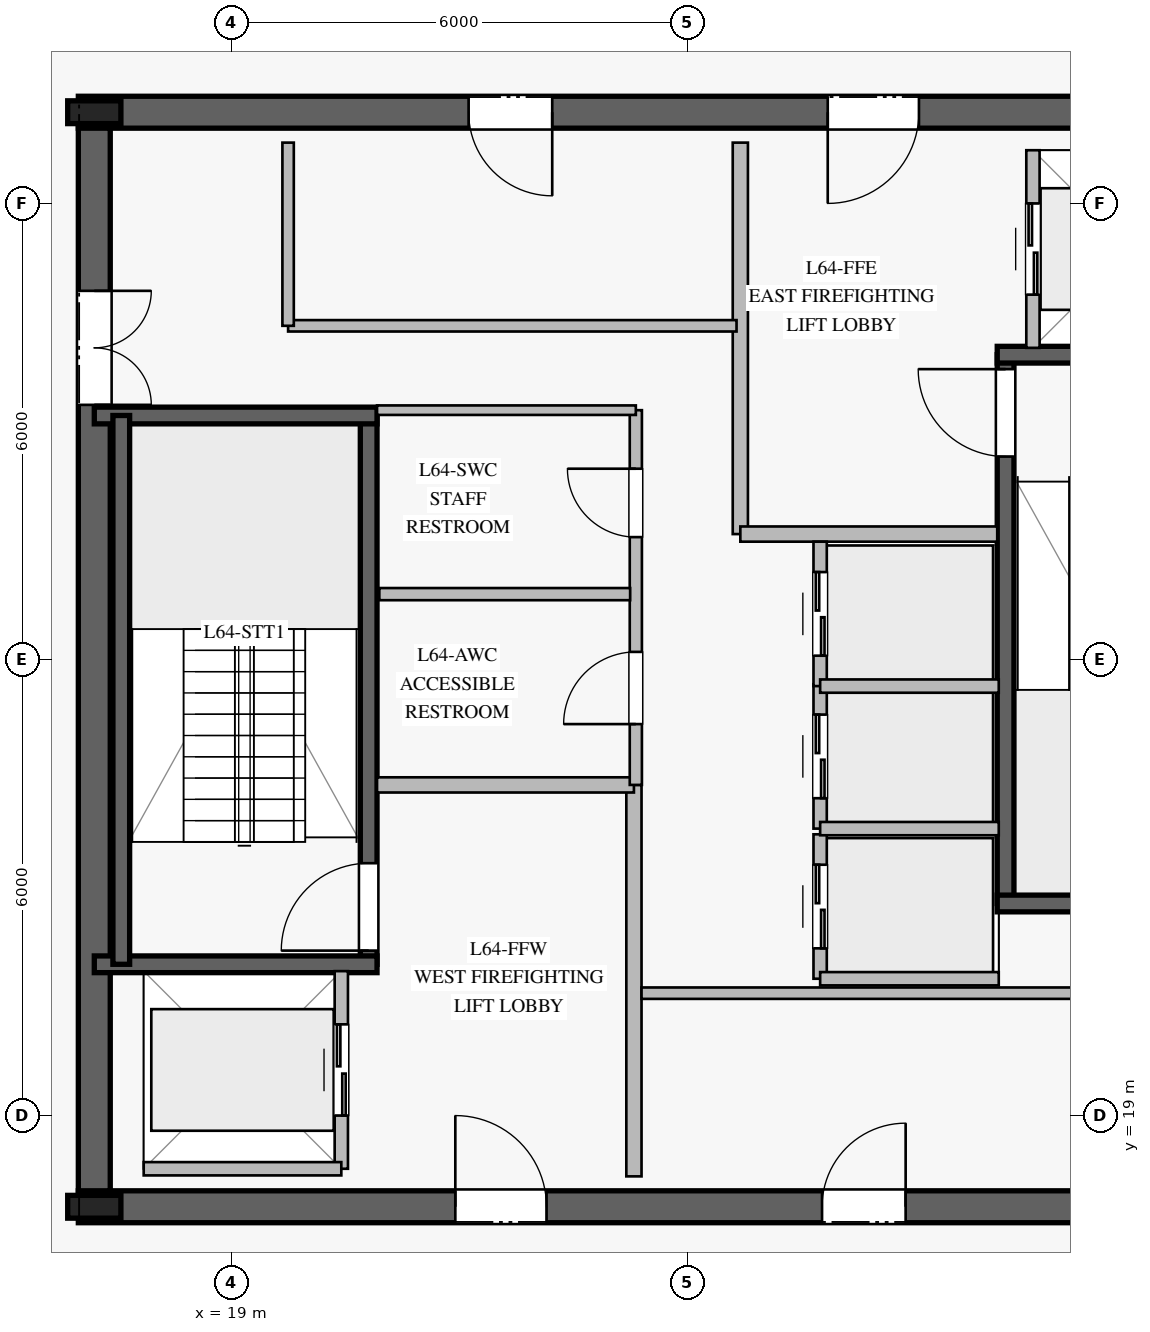
"""IFC4 building model, lengths in metres.
Left out: names, types, materials, properties, quantities, classifications, styles, units other than length and angle.
Written with IfcOpenShell. Run it as: python <this file> out.ifc"""

import sys

from ifc_helpers import new_model, si_unit, direction, frame, frame_2d, origin, origin_2d, place, context, subcontext, project, spatial, rectangle, i_section, extrude, element, fill, save


model = new_model("IFC4")
c1 = context("Model", 3, precision=1e-05, world=origin(), true_north=direction((0.0, 1.0)))
c2 = subcontext(c1, "Body", "Model", "MODEL_VIEW")
j1 = project(units=[si_unit("LENGTHUNIT", "METRE"), si_unit("PLANEANGLEUNIT", "RADIAN")], contexts=[c1])
p1 = place(None, origin())
s1 = spatial("IfcSite", under=j1, at=p1, CompositionType="ELEMENT")
p2 = place(p1, origin())
s2 = spatial("IfcBuilding", under=s1, at=p2, CompositionType="ELEMENT")
p3 = place(p2, frame((0.0, 0.0, 266.2)))
s3 = spatial("IfcBuildingStorey", under=s2, at=p3, CompositionType="ELEMENT", Elevation=266.2)
p4 = place(p3, frame((16.99, 17.8, 0.0), z_axis=(0.0, 0.0, 1.0), x_axis=(1.0, 0.0, 0.0)))
e1 = element("IfcWall", 1, at=p4, inside=s3, PredefinedType="SHEAR", context=c2, shape_type="SweptSolid", body=[
    extrude(rectangle(XDim=16.02, YDim=0.42, at=frame_2d((8.01, 0.0))), origin(), (0.0, 0.0, 1.0), 3.78),
])
p5 = place(p4, frame((4.96, 0.0, 0.0)))
e2 = element("IfcOpeningElement", 2, at=p5, cuts=e1, PredefinedType="OPENING", context=c2, shape_type="SweptSolid", body=[
    extrude(rectangle(XDim=1.2, YDim=2.25, at=frame_2d((0.6, 1.125))), frame((0.0, 0.22, 0.0), z_axis=(0.0, -1.0, 0.0), x_axis=(1.0, 0.0, 0.0)), (0.0, 0.0, 1.0), 0.44),
])
p6 = place(p4, frame((13.91, 0.0, 0.0)))
e3 = element("IfcOpeningElement", 3, at=p6, cuts=e1, PredefinedType="OPENING", context=c2, shape_type="SweptSolid", body=[
    extrude(rectangle(XDim=0.9, YDim=2.1, at=frame_2d((0.45, 1.05))), frame((0.0, 0.22, 0.0), z_axis=(0.0, -1.0, 0.0), x_axis=(1.0, 0.0, 0.0)), (0.0, 0.0, 1.0), 0.44),
])
p7 = place(p4, frame((9.785, 0.0, 0.0)))
e4 = element("IfcOpeningElement", 4, at=p7, cuts=e1, PredefinedType="OPENING", context=c2, shape_type="SweptSolid", body=[
    extrude(rectangle(XDim=1.1, YDim=2.2, at=frame_2d((0.55, 1.1))), frame((0.0, 0.22, 0.0), z_axis=(0.0, -1.0, 0.0), x_axis=(1.0, 0.0, 0.0)), (0.0, 0.0, 1.0), 0.44),
])
p8 = place(p3, frame((33.01, 32.2, 0.0), z_axis=(0.0, 0.0, 1.0), x_axis=(-1.0, 0.0, 0.0)))
e5 = element("IfcWall", 5, at=p8, inside=s3, PredefinedType="SHEAR", context=c2, shape_type="SweptSolid", body=[
    extrude(rectangle(XDim=16.02, YDim=0.42, at=frame_2d((8.01, 0.0))), origin(), (0.0, 0.0, 1.0), 3.78),
])
p9 = place(p8, frame((4.96, 0.0, 0.0)))
e6 = element("IfcOpeningElement", 6, at=p9, cuts=e5, PredefinedType="OPENING", context=c2, shape_type="SweptSolid", body=[
    extrude(rectangle(XDim=1.2, YDim=2.25, at=frame_2d((0.6, 1.125))), frame((0.0, 0.22, 0.0), z_axis=(0.0, -1.0, 0.0), x_axis=(1.0, 0.0, 0.0)), (0.0, 0.0, 1.0), 0.44),
])
p10 = place(p8, frame((9.785, 0.0, 0.0)))
e7 = element("IfcOpeningElement", 7, at=p10, cuts=e5, PredefinedType="OPENING", context=c2, shape_type="SweptSolid", body=[
    extrude(rectangle(XDim=1.1, YDim=2.2, at=frame_2d((0.55, 1.1))), frame((0.0, 0.22, 0.0), z_axis=(0.0, -1.0, 0.0), x_axis=(1.0, 0.0, 0.0)), (0.0, 0.0, 1.0), 0.44),
])
p11 = place(p3, frame((17.2, 31.99, 0.0), z_axis=(0.0, 0.0, 1.0), x_axis=(0.0, -1.0, 0.0)))
e8 = element("IfcWall", 8, at=p11, inside=s3, PredefinedType="SHEAR", context=c2, shape_type="SweptSolid", body=[
    extrude(rectangle(XDim=13.98, YDim=0.42, at=frame_2d((6.99, 0.0))), origin(), (0.0, 0.0, 1.0), 3.78),
])
p12 = place(p11, frame((2.14, 0.0, 0.0)))
e9 = element("IfcOpeningElement", 9, at=p12, cuts=e8, PredefinedType="OPENING", context=c2, shape_type="SweptSolid", body=[
    extrude(rectangle(XDim=1.5, YDim=2.2, at=frame_2d((0.75, 1.1))), frame((0.0, 0.22, 0.0), z_axis=(0.0, -1.0, 0.0), x_axis=(1.0, 0.0, 0.0)), (0.0, 0.0, 1.0), 0.44),
])
for number, where, z_axis, x_axis in (
    (10, (17.2, 17.8, 0.0), (0.0, 0.0, 1.0), (1.0, 0.0, 0.0)),
    (11, (17.2, 32.2, 0.0), (0.0, 0.0, 1.0), (1.0, 0.0, 0.0)),
):
    element("IfcColumn", number, at=place(p3, frame(where, z_axis=z_axis, x_axis=x_axis)), inside=s3, PredefinedType="COLUMN", context=c2, shape_type="SweptSolid", body=[
        extrude(i_section(OverallWidth=0.3, OverallDepth=0.7, WebThickness=0.017, FlangeThickness=0.032, at=origin_2d()), origin(), (0.0, 0.0, 1.0), 4.0),
    ])
p13 = place(p3, frame((20.81, 20.99, 0.0), z_axis=(0.0, 0.0, 1.0), x_axis=(0.0, 1.0, 0.0)))
e12 = element("IfcWall", 12, at=p13, inside=s3, PredefinedType="SOLIDWALL", context=c2, shape_type="SweptSolid", body=[
    extrude(rectangle(XDim=7.22, YDim=0.22, at=frame_2d((3.61, 0.0))), origin(), (0.0, 0.0, 1.0), 3.78),
])
p14 = place(p13, frame((0.18, 0.0, 0.0)))
e13 = element("IfcOpeningElement", 13, at=p14, cuts=e12, PredefinedType="OPENING", context=c2, shape_type="SweptSolid", body=[
    extrude(rectangle(XDim=1.15, YDim=2.2, at=frame_2d((0.575, 1.1))), frame((0.0, 0.12, 0.0), z_axis=(0.0, -1.0, 0.0), x_axis=(1.0, 0.0, 0.0)), (0.0, 0.0, 1.0), 0.24),
])
for number, where, z_axis, x_axis in (
    (14, (17.2, 20.99, 0.0), (0.0, 0.0, 1.0), (1.0, 0.0, 0.0)),
    (15, (17.2, 28.21, 0.0), (0.0, 0.0, 1.0), (1.0, 0.0, 0.0)),
):
    element("IfcWall", number, at=place(p3, frame(where, z_axis=z_axis, x_axis=x_axis)), inside=s3, PredefinedType="SOLIDWALL", context=c2, shape_type="SweptSolid", body=[
        extrude(rectangle(XDim=3.72, YDim=0.22, at=frame_2d((1.86, 0.0))), origin(), (0.0, 0.0, 1.0), 3.78),
    ])
p15 = place(p3, frame((17.555, 28.21, 0.0), z_axis=(0.0, 0.0, 1.0), x_axis=(0.0, -1.0, 0.0)))
e16 = element("IfcWall", 16, at=p15, inside=s3, PredefinedType="SOLIDWALL", context=c2, shape_type="SweptSolid", body=[
    extrude(rectangle(XDim=7.22, YDim=0.22, at=frame_2d((3.61, 0.0))), origin(), (0.0, 0.0, 1.0), 3.78),
])
p16 = place(p3, frame((29.19, 21.79, 0.0), z_axis=(0.0, 0.0, 1.0), x_axis=(0.0, 1.0, 0.0)))
e17 = element("IfcWall", 17, at=p16, inside=s3, PredefinedType="SOLIDWALL", context=c2, shape_type="SweptSolid", body=[
    extrude(rectangle(XDim=7.22, YDim=0.22, at=frame_2d((3.61, 0.0))), origin(), (0.0, 0.0, 1.0), 3.78),
])
p17 = place(p16, frame((5.88, 0.0, 0.0)))
e18 = element("IfcOpeningElement", 18, at=p17, cuts=e17, PredefinedType="OPENING", context=c2, shape_type="SweptSolid", body=[
    extrude(rectangle(XDim=1.15, YDim=2.2, at=frame_2d((0.575, 1.1))), frame((0.0, 0.12, 0.0), z_axis=(0.0, -1.0, 0.0), x_axis=(1.0, 0.0, 0.0)), (0.0, 0.0, 1.0), 0.24),
])
for number, where, z_axis, x_axis in (
    (19, (29.08, 21.79, 0.0), (0.0, 0.0, 1.0), (1.0, 0.0, 0.0)),
    (20, (29.08, 29.01, 0.0), (0.0, 0.0, 1.0), (1.0, 0.0, 0.0)),
):
    element("IfcWall", number, at=place(p3, frame(where, z_axis=z_axis, x_axis=x_axis)), inside=s3, PredefinedType="SOLIDWALL", context=c2, shape_type="SweptSolid", body=[
        extrude(rectangle(XDim=3.72, YDim=0.22, at=frame_2d((1.86, 0.0))), origin(), (0.0, 0.0, 1.0), 3.78),
    ])
p18 = place(p3, frame((24.3, 18.2, 0.0), z_axis=(0.0, 0.0, 1.0), x_axis=(0.0, 1.0, 0.0)))
e21 = element("IfcWall", 21, at=p18, inside=s3, PredefinedType="PARTITIONING", context=c2, shape_type="SweptSolid", body=[
    extrude(rectangle(XDim=5.15, YDim=0.2, at=frame_2d((2.575, 0.0))), origin(), (0.0, 0.0, 1.0), 3.78),
])
p19 = place(p3, frame((20.92, 23.35, 0.0), z_axis=(0.0, 0.0, 1.0), x_axis=(1.0, 0.0, 0.0)))
e22 = element("IfcWall", 22, at=p19, inside=s3, PredefinedType="PARTITIONING", context=c2, shape_type="SweptSolid", body=[
    extrude(rectangle(XDim=3.38, YDim=0.2, at=frame_2d((1.69, 0.0))), origin(), (0.0, 0.0, 1.0), 3.78),
])
p20 = place(p3, frame((25.7, 26.65, 0.0), z_axis=(0.0, 0.0, 1.0), x_axis=(0.0, 1.0, 0.0)))
e23 = element("IfcWall", 23, at=p20, inside=s3, PredefinedType="PARTITIONING", context=c2, shape_type="SweptSolid", body=[
    extrude(rectangle(XDim=5.15, YDim=0.2, at=frame_2d((2.575, 0.0))), origin(), (0.0, 0.0, 1.0), 3.78),
])
p21 = place(p3, frame((25.7, 26.65, 0.0), z_axis=(0.0, 0.0, 1.0), x_axis=(1.0, 0.0, 0.0)))
e24 = element("IfcWall", 24, at=p21, inside=s3, PredefinedType="PARTITIONING", context=c2, shape_type="SweptSolid", body=[
    extrude(rectangle(XDim=3.38, YDim=0.2, at=frame_2d((1.69, 0.0))), origin(), (0.0, 0.0, 1.0), 3.78),
])
p22 = place(p3, frame((24.325, 23.35, 0.0), z_axis=(0.0, 0.0, 1.0), x_axis=(0.0, 1.0, 0.0)))
e25 = element("IfcWall", 25, at=p22, inside=s3, PredefinedType="PLUMBINGWALL", context=c2, shape_type="SweptSolid", body=[
    extrude(rectangle(XDim=4.93, YDim=0.16, at=frame_2d((2.465, 0.0))), origin(), (0.0, 0.0, 1.0), 3.78),
])
p23 = place(p22, frame((0.8, 0.0, 0.0)))
e26 = element("IfcOpeningElement", 26, at=p23, cuts=e25, PredefinedType="OPENING", context=c2, shape_type="SweptSolid", body=[
    extrude(rectangle(XDim=0.95, YDim=2.1, at=frame_2d((0.475, 1.05))), frame((0.0, 0.09, 0.0), z_axis=(0.0, -1.0, 0.0), x_axis=(1.0, 0.0, 0.0)), (0.0, 0.0, 1.0), 0.18),
])
p24 = place(p22, frame((3.26, 0.0, 0.0)))
e27 = element("IfcOpeningElement", 27, at=p24, cuts=e25, PredefinedType="OPENING", context=c2, shape_type="SweptSolid", body=[
    extrude(rectangle(XDim=0.9, YDim=2.1, at=frame_2d((0.45, 1.05))), frame((0.0, 0.09, 0.0), z_axis=(0.0, -1.0, 0.0), x_axis=(1.0, 0.0, 0.0)), (0.0, 0.0, 1.0), 0.18),
])
p25 = place(p3, frame((20.92, 28.28, 0.0), z_axis=(0.0, 0.0, 1.0), x_axis=(1.0, 0.0, 0.0)))
e28 = element("IfcWall", 28, at=p25, inside=s3, PredefinedType="PARTITIONING", context=c2, shape_type="SweptSolid", body=[
    extrude(rectangle(XDim=3.405, YDim=0.125, at=frame_2d((1.703, 0.0))), origin(), (0.0, 0.0, 1.0), 3.78),
])
p26 = place(p3, frame((20.95, 25.86, 0.0), z_axis=(0.0, 0.0, 1.0), x_axis=(1.0, 0.0, 0.0)))
e29 = element("IfcWall", 29, at=p26, inside=s3, PredefinedType="PLUMBINGWALL", context=c2, shape_type="SweptSolid", body=[
    extrude(rectangle(XDim=3.3, YDim=0.16, at=frame_2d((1.65, 0.0))), origin(), (0.0, 0.0, 1.0), 3.78),
])
p27 = place(p3, frame((24.4, 20.61, 0.0), z_axis=(0.0, 0.0, 1.0), x_axis=(1.0, 0.0, 0.0)))
e30 = element("IfcWall", 30, at=p27, inside=s3, PredefinedType="PARTITIONING", context=c2, shape_type="SweptSolid", body=[
    extrude(rectangle(XDim=5.9, YDim=0.15, at=frame_2d((2.95, 0.0))), origin(), (0.0, 0.0, 1.0), 3.78),
])
p28 = place(p3, frame((19.75, 29.39, 0.0), z_axis=(0.0, 0.0, 1.0), x_axis=(1.0, 0.0, 0.0)))
e31 = element("IfcWall", 31, at=p28, inside=s3, PredefinedType="PARTITIONING", context=c2, shape_type="SweptSolid", body=[
    extrude(rectangle(XDim=5.9, YDim=0.15, at=frame_2d((2.95, 0.0))), origin(), (0.0, 0.0, 1.0), 3.78),
])
p29 = place(p3, frame((19.75, 29.39, 0.0), z_axis=(0.0, 0.0, 1.0), x_axis=(0.0, 1.0, 0.0)))
e32 = element("IfcWall", 32, at=p29, inside=s3, PredefinedType="PARTITIONING", context=c2, shape_type="SweptSolid", body=[
    extrude(rectangle(XDim=2.41, YDim=0.15, at=frame_2d((1.205, 0.0))), origin(), (0.0, 0.0, 1.0), 3.78),
])
p30 = place(p3, frame((26.75, 20.8, 0.0), z_axis=(0.0, 0.0, 1.0), x_axis=(0.0, 1.0, 0.0)))
e33 = element("IfcWall", 33, at=p30, inside=s3, PredefinedType="PARTITIONING", context=c2, shape_type="SweptSolid", body=[
    extrude(rectangle(XDim=1.9, YDim=0.175, at=frame_2d((0.95, 0.0))), origin(), (0.0, 0.0, 1.0), 3.78),
])
p31 = place(p30, frame((0.4, 0.0, 0.0)))
e34 = element("IfcOpeningElement", 34, at=p31, cuts=e33, PredefinedType="OPENING", context=c2, shape_type="SweptSolid", body=[
    extrude(rectangle(XDim=1.1, YDim=2.2, at=frame_2d((0.55, 1.1))), frame((0.0, 0.098, 0.0), z_axis=(0.0, -1.0, 0.0), x_axis=(1.0, 0.0, 0.0)), (0.0, 0.0, 1.0), 0.195),
])
p32 = place(p3, frame((26.75, 20.8, 0.0), z_axis=(0.0, 0.0, 1.0), x_axis=(1.0, 0.0, 0.0)))
e35 = element("IfcWall", 35, at=p32, inside=s3, PredefinedType="PARTITIONING", context=c2, shape_type="SweptSolid", body=[
    extrude(rectangle(XDim=2.35, YDim=0.175, at=frame_2d((1.175, 0.0))), origin(), (0.0, 0.0, 1.0), 3.78),
])
p33 = place(p3, frame((26.75, 22.775, 0.0), z_axis=(0.0, 0.0, 1.0), x_axis=(0.0, 1.0, 0.0)))
e36 = element("IfcWall", 36, at=p33, inside=s3, PredefinedType="PARTITIONING", context=c2, shape_type="SweptSolid", body=[
    extrude(rectangle(XDim=1.9, YDim=0.175, at=frame_2d((0.95, 0.0))), origin(), (0.0, 0.0, 1.0), 3.78),
])
p34 = place(p33, frame((0.4, 0.0, 0.0)))
e37 = element("IfcOpeningElement", 37, at=p34, cuts=e36, PredefinedType="OPENING", context=c2, shape_type="SweptSolid", body=[
    extrude(rectangle(XDim=1.1, YDim=2.2, at=frame_2d((0.55, 1.1))), frame((0.0, 0.098, 0.0), z_axis=(0.0, -1.0, 0.0), x_axis=(1.0, 0.0, 0.0)), (0.0, 0.0, 1.0), 0.195),
])
p35 = place(p3, frame((26.75, 22.775, 0.0), z_axis=(0.0, 0.0, 1.0), x_axis=(1.0, 0.0, 0.0)))
e38 = element("IfcWall", 38, at=p35, inside=s3, PredefinedType="PARTITIONING", context=c2, shape_type="SweptSolid", body=[
    extrude(rectangle(XDim=2.35, YDim=0.175, at=frame_2d((1.175, 0.0))), origin(), (0.0, 0.0, 1.0), 3.78),
])
p36 = place(p3, frame((26.75, 24.65, 0.0), z_axis=(0.0, 0.0, 1.0), x_axis=(0.0, 1.0, 0.0)))
e39 = element("IfcWall", 39, at=p36, inside=s3, PredefinedType="PARTITIONING", context=c2, shape_type="SweptSolid", body=[
    extrude(rectangle(XDim=1.9, YDim=0.175, at=frame_2d((0.95, 0.0))), origin(), (0.0, 0.0, 1.0), 3.78),
])
p37 = place(p36, frame((0.4, 0.0, 0.0)))
e40 = element("IfcOpeningElement", 40, at=p37, cuts=e39, PredefinedType="OPENING", context=c2, shape_type="SweptSolid", body=[
    extrude(rectangle(XDim=1.1, YDim=2.2, at=frame_2d((0.55, 1.1))), frame((0.0, 0.098, 0.0), z_axis=(0.0, -1.0, 0.0), x_axis=(1.0, 0.0, 0.0)), (0.0, 0.0, 1.0), 0.195),
])
p38 = place(p3, frame((26.75, 24.65, 0.0), z_axis=(0.0, 0.0, 1.0), x_axis=(1.0, 0.0, 0.0)))
e41 = element("IfcWall", 41, at=p38, inside=s3, PredefinedType="PARTITIONING", context=c2, shape_type="SweptSolid", body=[
    extrude(rectangle(XDim=2.35, YDim=0.175, at=frame_2d((1.175, 0.0))), origin(), (0.0, 0.0, 1.0), 3.78),
])
p39 = place(p3, frame((20.45, 18.3, 0.0), z_axis=(0.0, 0.0, 1.0), x_axis=(0.0, 1.0, 0.0)))
e42 = element("IfcWall", 42, at=p39, inside=s3, PredefinedType="PARTITIONING", context=c2, shape_type="SweptSolid", body=[
    extrude(rectangle(XDim=2.6, YDim=0.175, at=frame_2d((1.3, 0.0))), origin(), (0.0, 0.0, 1.0), 3.78),
])
p40 = place(p39, frame((0.7, 0.0, 0.0)))
e43 = element("IfcOpeningElement", 43, at=p40, cuts=e42, PredefinedType="OPENING", context=c2, shape_type="SweptSolid", body=[
    extrude(rectangle(XDim=1.2, YDim=2.2, at=frame_2d((0.6, 1.1))), frame((0.0, 0.098, 0.0), z_axis=(0.0, -1.0, 0.0), x_axis=(1.0, 0.0, 0.0)), (0.0, 0.0, 1.0), 0.195),
])
p41 = place(p3, frame((17.85, 18.3, 0.0), z_axis=(0.0, 0.0, 1.0), x_axis=(1.0, 0.0, 0.0)))
e44 = element("IfcWall", 44, at=p41, inside=s3, PredefinedType="PARTITIONING", context=c2, shape_type="SweptSolid", body=[
    extrude(rectangle(XDim=2.6, YDim=0.175, at=frame_2d((1.3, 0.0))), origin(), (0.0, 0.0, 1.0), 3.78),
])
p42 = place(p3, frame((29.55, 29.1, 0.0), z_axis=(0.0, 0.0, 1.0), x_axis=(0.0, 1.0, 0.0)))
e45 = element("IfcWall", 45, at=p42, inside=s3, PredefinedType="PARTITIONING", context=c2, shape_type="SweptSolid", body=[
    extrude(rectangle(XDim=2.6, YDim=0.175, at=frame_2d((1.3, 0.0))), origin(), (0.0, 0.0, 1.0), 3.78),
])
p43 = place(p42, frame((0.7, 0.0, 0.0)))
e46 = element("IfcOpeningElement", 46, at=p43, cuts=e45, PredefinedType="OPENING", context=c2, shape_type="SweptSolid", body=[
    extrude(rectangle(XDim=1.2, YDim=2.2, at=frame_2d((0.6, 1.1))), frame((0.0, 0.098, 0.0), z_axis=(0.0, -1.0, 0.0), x_axis=(1.0, 0.0, 0.0)), (0.0, 0.0, 1.0), 0.195),
])
p44 = place(p14, origin())
e47 = element("IfcDoor", 47, at=p44, inside=s3, OperationType="SINGLE_SWING_LEFT", PredefinedType="DOOR", context=c2, shape_type="SweptSolid", body=[
    extrude(rectangle(XDim=1.15, YDim=2.2, at=frame_2d((0.575, 1.1))), frame((0.0, 0.025, 0.0), z_axis=(0.0, -1.0, 0.0), x_axis=(1.0, 0.0, 0.0)), (0.0, 0.0, 1.0), 0.05),
])
fill(e13, e47)
p45 = place(p17, origin())
e48 = element("IfcDoor", 48, at=p45, inside=s3, OperationType="SINGLE_SWING_RIGHT", PredefinedType="DOOR", context=c2, shape_type="SweptSolid", body=[
    extrude(rectangle(XDim=1.15, YDim=2.2, at=frame_2d((0.575, 1.1))), frame((0.0, 0.025, 0.0), z_axis=(0.0, -1.0, 0.0), x_axis=(1.0, 0.0, 0.0)), (0.0, 0.0, 1.0), 0.05),
])
fill(e18, e48)
p46 = place(p5, origin())
e49 = element("IfcDoor", 49, at=p46, inside=s3, OperationType="SINGLE_SWING_LEFT", PredefinedType="DOOR", context=c2, shape_type="SweptSolid", body=[
    extrude(rectangle(XDim=1.2, YDim=2.25, at=frame_2d((0.6, 1.125))), frame((0.0, 0.025, 0.0), z_axis=(0.0, -1.0, 0.0), x_axis=(1.0, 0.0, 0.0)), (0.0, 0.0, 1.0), 0.05),
])
fill(e2, e49)
p47 = place(p9, origin())
e50 = element("IfcDoor", 50, at=p47, inside=s3, OperationType="SINGLE_SWING_RIGHT", PredefinedType="DOOR", context=c2, shape_type="SweptSolid", body=[
    extrude(rectangle(XDim=1.2, YDim=2.25, at=frame_2d((0.6, 1.125))), frame((0.0, 0.025, 0.0), z_axis=(0.0, -1.0, 0.0), x_axis=(1.0, 0.0, 0.0)), (0.0, 0.0, 1.0), 0.05),
])
fill(e6, e50)
p48 = place(p12, origin())
e51 = element("IfcDoor", 51, at=p48, inside=s3, OperationType="DOUBLE_DOOR_SINGLE_SWING", PredefinedType="DOOR", context=c2, shape_type="SweptSolid", body=[
    extrude(rectangle(XDim=1.5, YDim=2.2, at=frame_2d((0.75, 1.1))), frame((0.0, 0.025, 0.0), z_axis=(0.0, -1.0, 0.0), x_axis=(1.0, 0.0, 0.0)), (0.0, 0.0, 1.0), 0.05),
])
fill(e9, e51)
p49 = place(p23, origin())
e52 = element("IfcDoor", 52, at=p49, inside=s3, OperationType="SINGLE_SWING_LEFT", PredefinedType="DOOR", context=c2, shape_type="SweptSolid", body=[
    extrude(rectangle(XDim=0.95, YDim=2.1, at=frame_2d((0.475, 1.05))), frame((0.0, 0.025, 0.0), z_axis=(0.0, -1.0, 0.0), x_axis=(1.0, 0.0, 0.0)), (0.0, 0.0, 1.0), 0.05),
])
fill(e26, e52)
p50 = place(p24, origin())
e53 = element("IfcDoor", 53, at=p50, inside=s3, OperationType="SINGLE_SWING_RIGHT", PredefinedType="DOOR", context=c2, shape_type="SweptSolid", body=[
    extrude(rectangle(XDim=0.9, YDim=2.1, at=frame_2d((0.45, 1.05))), frame((0.0, 0.025, 0.0), z_axis=(0.0, -1.0, 0.0), x_axis=(1.0, 0.0, 0.0)), (0.0, 0.0, 1.0), 0.05),
])
fill(e27, e53)
p51 = place(p7, origin())
e54 = element("IfcDoor", 54, at=p51, inside=s3, OperationType="SINGLE_SWING_RIGHT", PredefinedType="DOOR", context=c2, shape_type="SweptSolid", body=[
    extrude(rectangle(XDim=1.1, YDim=2.2, at=frame_2d((0.55, 1.1))), frame((0.0, 0.025, 0.0), z_axis=(0.0, -1.0, 0.0), x_axis=(1.0, 0.0, 0.0)), (0.0, 0.0, 1.0), 0.05),
])
fill(e4, e54)
p52 = place(p10, origin())
e55 = element("IfcDoor", 55, at=p52, inside=s3, OperationType="SINGLE_SWING_LEFT", PredefinedType="DOOR", context=c2, shape_type="SweptSolid", body=[
    extrude(rectangle(XDim=1.1, YDim=2.2, at=frame_2d((0.55, 1.1))), frame((0.0, 0.025, 0.0), z_axis=(0.0, -1.0, 0.0), x_axis=(1.0, 0.0, 0.0)), (0.0, 0.0, 1.0), 0.05),
])
fill(e7, e55)
p53 = place(p31, origin())
e56 = element("IfcDoor", 56, at=p53, inside=s3, OperationType="DOUBLE_DOOR_SLIDING", PredefinedType="DOOR", context=c2, shape_type="SweptSolid", body=[
    extrude(rectangle(XDim=1.1, YDim=2.2, at=frame_2d((0.55, 1.1))), frame((0.0, 0.025, 0.0), z_axis=(0.0, -1.0, 0.0), x_axis=(1.0, 0.0, 0.0)), (0.0, 0.0, 1.0), 0.05),
])
fill(e34, e56)
p54 = place(p34, origin())
e57 = element("IfcDoor", 57, at=p54, inside=s3, OperationType="DOUBLE_DOOR_SLIDING", PredefinedType="DOOR", context=c2, shape_type="SweptSolid", body=[
    extrude(rectangle(XDim=1.1, YDim=2.2, at=frame_2d((0.55, 1.1))), frame((0.0, 0.025, 0.0), z_axis=(0.0, -1.0, 0.0), x_axis=(1.0, 0.0, 0.0)), (0.0, 0.0, 1.0), 0.05),
])
fill(e37, e57)
p55 = place(p37, origin())
e58 = element("IfcDoor", 58, at=p55, inside=s3, OperationType="DOUBLE_DOOR_SLIDING", PredefinedType="DOOR", context=c2, shape_type="SweptSolid", body=[
    extrude(rectangle(XDim=1.1, YDim=2.2, at=frame_2d((0.55, 1.1))), frame((0.0, 0.025, 0.0), z_axis=(0.0, -1.0, 0.0), x_axis=(1.0, 0.0, 0.0)), (0.0, 0.0, 1.0), 0.05),
])
fill(e40, e58)
p56 = place(p40, origin())
e59 = element("IfcDoor", 59, at=p56, inside=s3, OperationType="DOUBLE_DOOR_SLIDING", PredefinedType="DOOR", context=c2, shape_type="SweptSolid", body=[
    extrude(rectangle(XDim=1.2, YDim=2.2, at=frame_2d((0.6, 1.1))), frame((0.0, 0.025, 0.0), z_axis=(0.0, -1.0, 0.0), x_axis=(1.0, 0.0, 0.0)), (0.0, 0.0, 1.0), 0.05),
])
fill(e43, e59)
p57 = place(p43, origin())
e60 = element("IfcDoor", 60, at=p57, inside=s3, OperationType="DOUBLE_DOOR_SLIDING", PredefinedType="DOOR", context=c2, shape_type="SweptSolid", body=[
    extrude(rectangle(XDim=1.2, YDim=2.2, at=frame_2d((0.6, 1.1))), frame((0.0, 0.025, 0.0), z_axis=(0.0, -1.0, 0.0), x_axis=(1.0, 0.0, 0.0)), (0.0, 0.0, 1.0), 0.05),
])
fill(e46, e60)
save(model, sys.argv[1])
